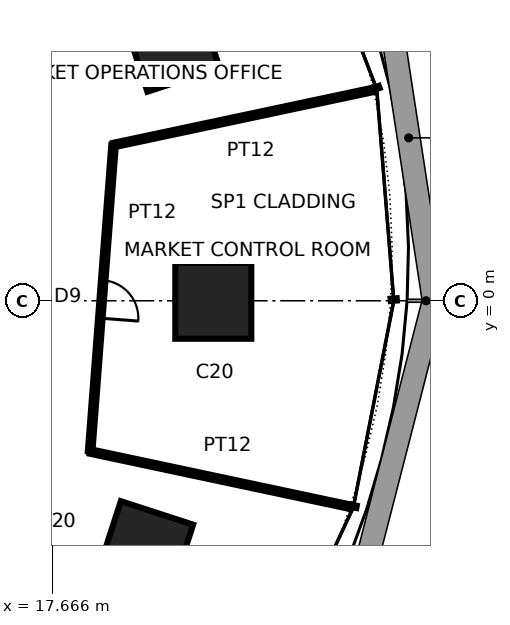
"""IFC4 building model, lengths in metres.
Left out: names, types, materials, properties, quantities, classifications, styles, units other than length and angle.
Written with IfcOpenShell. Run it as: python <this file> out.ifc"""

import sys

from ifc_helpers import new_model, si_unit, direction, frame, frame_2d, origin, origin_2d, place, context, subcontext, project, spatial, rectangle, extrude, element, fill, save


model = new_model("IFC4")
c1 = context("Model", 3, precision=1e-05, world=origin(), true_north=direction((0.0, 1.0)))
c2 = subcontext(c1, "Body", "Model", "MODEL_VIEW")
j1 = project(units=[si_unit("LENGTHUNIT", "METRE"), si_unit("PLANEANGLEUNIT", "RADIAN")], contexts=[c1])
p1 = place(None, origin())
s1 = spatial("IfcSite", under=j1, at=p1, CompositionType="ELEMENT")
p2 = place(p1, origin())
s2 = spatial("IfcBuilding", under=s1, at=p2, CompositionType="ELEMENT")
p3 = place(p2, frame((0.0, 0.0, 82.6)))
s3 = spatial("IfcBuildingStorey", under=s2, at=p3, CompositionType="ELEMENT", Elevation=82.6)
for number, where, z_axis, x_axis in (
    (1, (21.9, 0.0, 0.0), (0.0, 0.0, 1.0), (1.0, 0.0, 0.0)),
    (2, (20.808, 6.761, 0.0), (0.0, 0.0, 1.0), (0.951, 0.309, 0.0)),
    (3, (20.109, -6.534, 0.0), (0.0, 0.0, 1.0), (0.951, -0.309, 0.0)),
):
    element("IfcColumn", number, at=place(p3, frame(where, z_axis=z_axis, x_axis=x_axis)), inside=s3, PredefinedType="COLUMN", context=c2, shape_type="SweptSolid", body=[
        extrude(rectangle(XDim=2.0, YDim=2.0, at=origin_2d()), origin(), (0.0, 0.0, 1.0), 4.2),
    ])
p4 = place(p3, frame((18.659, -3.966, 0.0), z_axis=(0.0, 0.0, 1.0), x_axis=(0.978148655968, -0.207906726269, 0.0)))
e4 = element("IfcWall", 4, at=p4, inside=s3, PredefinedType="PARTITIONING", context=c2, shape_type="SweptSolid", body=[
    extrude(rectangle(XDim=7.0, YDim=0.12, at=frame_2d((3.5, 0.0))), origin(), (0.0, 0.0, 1.0), 4.0),
])
p5 = place(p3, frame((19.276, 4.097, 0.0), z_axis=(0.0, 0.0, 1.0), x_axis=(-0.076255565094, -0.997088305413, 0.0)))
e5 = element("IfcWall", 5, at=p5, inside=s3, PredefinedType="PARTITIONING", context=c2, shape_type="SweptSolid", body=[
    extrude(rectangle(XDim=8.087, YDim=0.12, at=frame_2d((4.043, 0.0))), origin(), (0.0, 0.0, 1.0), 3.467),
])
p6 = place(p5, frame((3.569, 0.0, 0.0)))
e6 = element("IfcOpeningElement", 6, at=p6, cuts=e5, PredefinedType="OPENING", context=c2, shape_type="SweptSolid", body=[
    extrude(rectangle(XDim=1.0, YDim=2.4, at=frame_2d((0.5, 1.2))), frame((0.0, 0.07, 0.0), z_axis=(0.0, -1.0, 0.0), x_axis=(1.0, 0.0, 0.0)), (0.0, 0.0, 1.0), 0.14),
])
p7 = place(p3, frame((26.123, 5.553, 0.0), z_axis=(0.0, 0.0, 1.0), x_axis=(-0.978150163492, -0.207899633622, 0.0)))
e7 = element("IfcWall", 7, at=p7, inside=s3, PredefinedType="PARTITIONING", context=c2, shape_type="SweptSolid", body=[
    extrude(rectangle(XDim=7.0, YDim=0.12, at=frame_2d((3.5, 0.0))), origin(), (0.0, 0.0, 1.0), 4.0),
])
p8 = place(p6, origin())
e8 = element("IfcDoor", 8, at=p8, inside=s3, OperationType="SINGLE_SWING_RIGHT", PredefinedType="DOOR", context=c2, shape_type="SweptSolid", body=[
    extrude(rectangle(XDim=1.0, YDim=2.4, at=frame_2d((0.5, 1.2))), frame((0.0, 0.025, 0.0), z_axis=(0.0, -1.0, 0.0), x_axis=(1.0, 0.0, 0.0)), (0.0, 0.0, 1.0), 0.05),
])
fill(e6, e8)
save(model, sys.argv[1])
